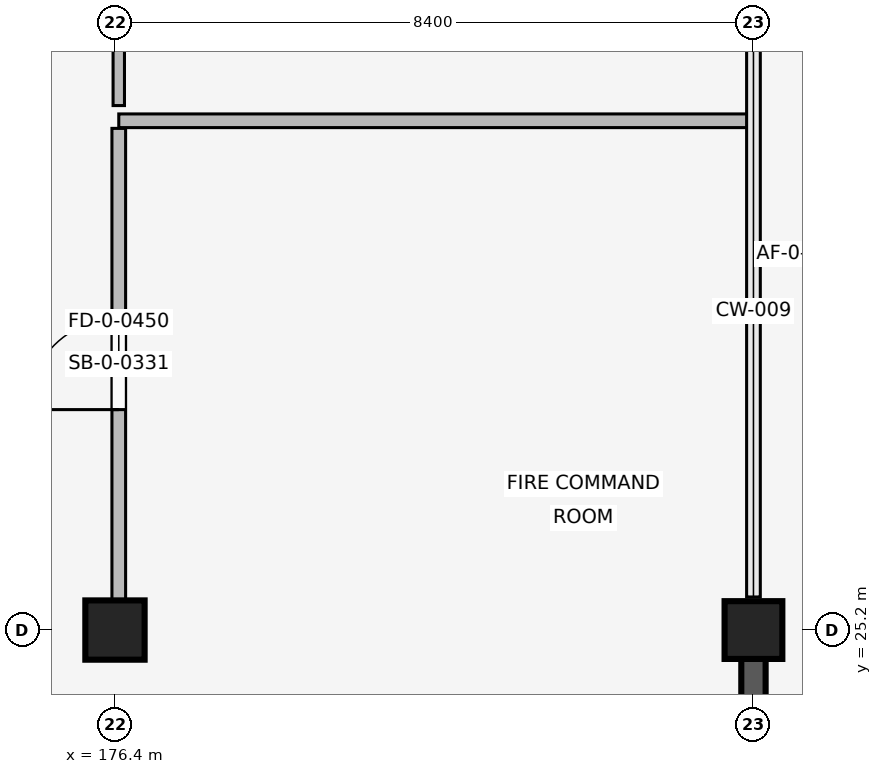
"""IFC4 building model, lengths in metres.
Left out: names, types, materials, properties, quantities, classifications, styles, units other than length and angle.
Written with IfcOpenShell. Run it as: python <this file> out.ifc"""

import sys

from ifc_helpers import new_model, si_unit, direction, frame, frame_2d, origin, origin_2d, place, context, subcontext, project, spatial, rectangle, extrude, element, fill, save


model = new_model("IFC4")
c1 = context("Model", 3, precision=1e-05, world=origin(), true_north=direction((0.0, 1.0)))
c2 = subcontext(c1, "Body", "Model", "MODEL_VIEW")
j1 = project(units=[si_unit("LENGTHUNIT", "METRE"), si_unit("PLANEANGLEUNIT", "RADIAN")], contexts=[c1])
p1 = place(None, origin())
s1 = spatial("IfcSite", under=j1, at=p1, CompositionType="ELEMENT")
p2 = place(p1, origin())
s2 = spatial("IfcBuilding", under=s1, at=p2, CompositionType="ELEMENT")
p3 = place(p2, origin())
s3 = spatial("IfcBuildingStorey", under=s2, at=p3, CompositionType="ELEMENT", Elevation=0.0)
p4 = place(p3, frame((176.4, 25.2, 0.0), z_axis=(0.0, 0.0, 1.0), x_axis=(1.0, 0.0, 0.0)))
e1 = element("IfcColumn", 1, at=p4, inside=s3, PredefinedType="COLUMN", context=c2, shape_type="SweptSolid", body=[
    extrude(rectangle(XDim=0.78, YDim=0.78, at=origin_2d()), origin(), (0.0, 0.0, 1.0), 4.8),
])
p5 = place(p3, frame((184.8, 25.2, 0.0), z_axis=(0.0, 0.0, 1.0), x_axis=(1.0, 0.0, 0.0)))
e2 = element("IfcColumn", 2, at=p5, inside=s3, PredefinedType="COLUMN", context=c2, shape_type="SweptSolid", body=[
    extrude(rectangle(XDim=0.76, YDim=0.76, at=origin_2d()), origin(), (0.0, 0.0, 1.0), 4.8),
])
p6 = place(p3, frame((184.8, 24.825, 0.0), z_axis=(0.0, 0.0, 1.0), x_axis=(0.0, -1.0, 0.0)))
e3 = element("IfcWall", 3, at=p6, inside=s3, PredefinedType="SOLIDWALL", context=c2, shape_type="SweptSolid", body=[
    extrude(rectangle(XDim=7.65, YDim=0.32, at=frame_2d((3.825, 0.0))), origin(), (0.0, 0.0, 1.0), 3.82),
])
p7 = place(p6, frame((1.119, 0.0, 0.85)))
e4 = element("IfcOpeningElement", 4, at=p7, cuts=e3, PredefinedType="OPENING", context=c2, shape_type="SweptSolid", body=[
    extrude(rectangle(XDim=1.28, YDim=1.38, at=frame_2d((0.64, 0.69))), frame((0.0, 0.17, 0.0), z_axis=(0.0, -1.0, 0.0), x_axis=(1.0, 0.0, 0.0)), (0.0, 0.0, 1.0), 0.34),
])
p8 = place(p6, frame((5.25, 0.0, 0.85)))
e5 = element("IfcOpeningElement", 5, at=p8, cuts=e3, PredefinedType="OPENING", context=c2, shape_type="SweptSolid", body=[
    extrude(rectangle(XDim=1.28, YDim=1.38, at=frame_2d((0.64, 0.69))), frame((0.0, 0.17, 0.0), z_axis=(0.0, -1.0, 0.0), x_axis=(1.0, 0.0, 0.0)), (0.0, 0.0, 1.0), 0.34),
])
p9 = place(p3, frame((184.82, 30.15, 0.0), z_axis=(0.0, 0.0, 1.0), x_axis=(1.0, 0.0, 0.0)))
e6 = element("IfcWall", 6, at=p9, inside=s3, PredefinedType="ELEMENTEDWALL", context=c2, shape_type="SweptSolid", body=[
    extrude(rectangle(XDim=1.03, YDim=0.26, at=frame_2d((0.515, 0.0))), origin(), (0.0, 0.0, 1.0), 3.82),
])
p10 = place(p3, frame((176.45, 25.6, 0.0), z_axis=(0.0, 0.0, 1.0), x_axis=(0.0, 1.0, 0.0)))
e7 = element("IfcWall", 7, at=p10, inside=s3, PredefinedType="PARTITIONING", context=c2, shape_type="SweptSolid", body=[
    extrude(rectangle(XDim=6.2, YDim=0.18, at=frame_2d((3.1, 0.0))), origin(), (0.0, 0.0, 1.0), 3.8),
])
p11 = place(p10, frame((2.5, 0.0, 0.0)))
e8 = element("IfcOpeningElement", 8, at=p11, cuts=e7, PredefinedType="OPENING", context=c2, shape_type="SweptSolid", body=[
    extrude(rectangle(XDim=1.2, YDim=2.2, at=frame_2d((0.6, 1.1))), frame((0.0, 0.1, 0.0), z_axis=(0.0, -1.0, 0.0), x_axis=(1.0, 0.0, 0.0)), (0.0, 0.0, 1.0), 0.2),
])
p12 = place(p3, frame((176.45, 31.9, 0.0), z_axis=(0.0, 0.0, 1.0), x_axis=(1.0, 0.0, 0.0)))
e9 = element("IfcWall", 9, at=p12, inside=s3, PredefinedType="PARTITIONING", context=c2, shape_type="SweptSolid", body=[
    extrude(rectangle(XDim=8.29, YDim=0.18, at=frame_2d((4.145, 0.0))), origin(), (0.0, 0.0, 1.0), 3.8),
])
p13 = place(p3, frame((176.45, 32.1, 0.0), z_axis=(0.0, 0.0, 1.0), x_axis=(0.0, 1.0, 0.0)))
e10 = element("IfcWall", 10, at=p13, inside=s3, PredefinedType="PARTITIONING", context=c2, shape_type="SweptSolid", body=[
    extrude(rectangle(XDim=17.9, YDim=0.15, at=frame_2d((8.95, 0.0))), origin(), (0.0, 0.0, 1.0), 3.8),
])
p14 = place(p13, frame((4.6, 0.0, 0.0)))
e11 = element("IfcOpeningElement", 11, at=p14, cuts=e10, PredefinedType="OPENING", context=c2, shape_type="SweptSolid", body=[
    extrude(rectangle(XDim=1.9, YDim=2.4, at=frame_2d((0.95, 1.2))), frame((0.0, 0.085, 0.0), z_axis=(0.0, -1.0, 0.0), x_axis=(1.0, 0.0, 0.0)), (0.0, 0.0, 1.0), 0.17),
])
p15 = place(p11, origin())
e12 = element("IfcDoor", 12, at=p15, inside=s3, OperationType="SINGLE_SWING_LEFT", PredefinedType="DOOR", context=c2, shape_type="SweptSolid", body=[
    extrude(rectangle(XDim=1.2, YDim=2.2, at=frame_2d((0.6, 1.1))), frame((0.0, 0.025, 0.0), z_axis=(0.0, -1.0, 0.0), x_axis=(1.0, 0.0, 0.0)), (0.0, 0.0, 1.0), 0.05),
])
fill(e8, e12)
save(model, sys.argv[1])
